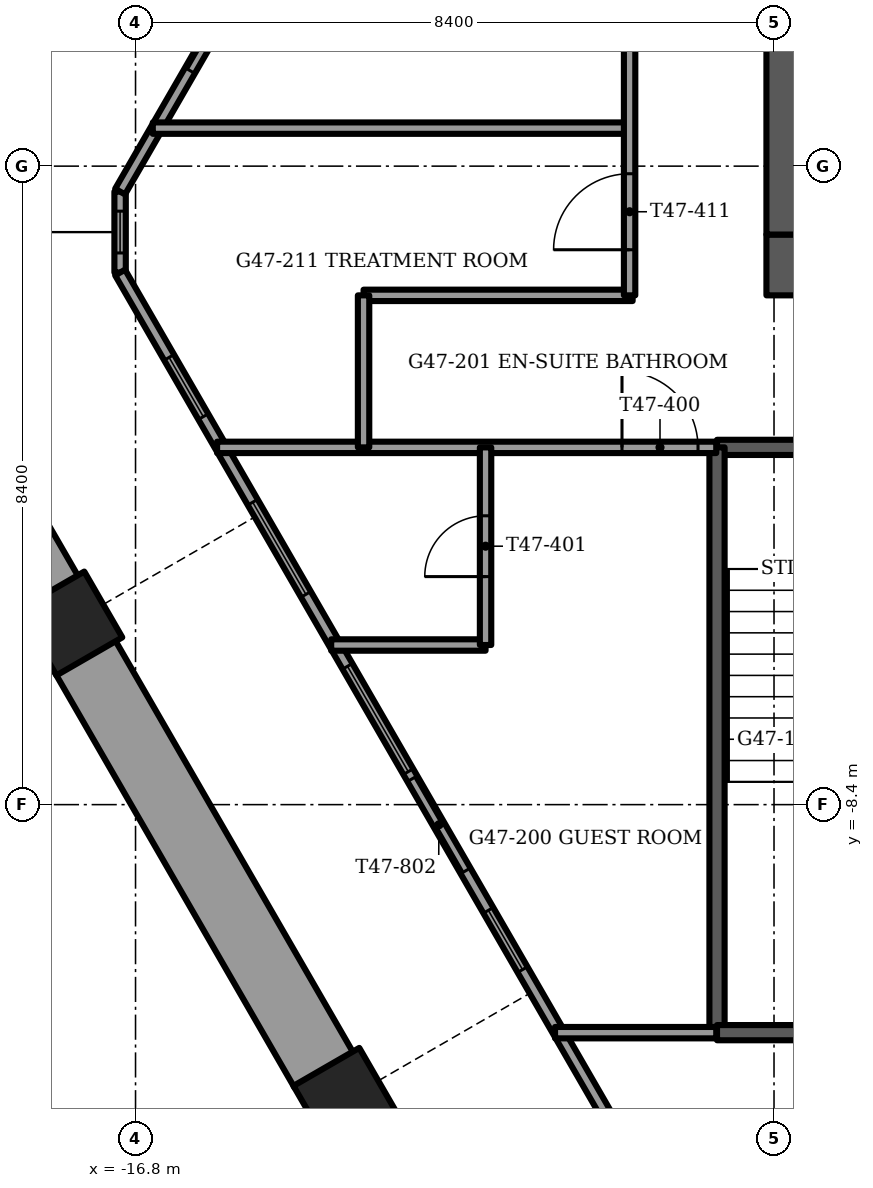
"""IFC4 building model, lengths in metres.
Left out: names, types, materials, properties, quantities, classifications, styles, units other than length and angle.
Written with IfcOpenShell. Run it as: python <this file> out.ifc"""

import sys

from ifc_helpers import new_model, si_unit, direction, frame, frame_2d, origin, origin_2d, place, context, subcontext, project, spatial, rectangle, extrude, element, fill, save


model = new_model("IFC4")
c1 = context("Model", 3, precision=1e-05, world=origin(), true_north=direction((0.0, 1.0)))
c2 = subcontext(c1, "Body", "Model", "MODEL_VIEW")
j1 = project(units=[si_unit("LENGTHUNIT", "METRE"), si_unit("PLANEANGLEUNIT", "RADIAN")], contexts=[c1])
p1 = place(None, origin())
s1 = spatial("IfcSite", under=j1, at=p1, CompositionType="ELEMENT")
p2 = place(p1, origin())
s2 = spatial("IfcBuilding", under=s1, at=p2, CompositionType="ELEMENT")
p3 = place(p2, frame((0.0, 0.0, 190.75)))
s3 = spatial("IfcBuildingStorey", under=s2, at=p3, CompositionType="ELEMENT", Elevation=190.75)
for number, where, z_axis, x_axis in (
    (1, (-17.657, -6.017, -1.2), (0.0, 0.0, 1.0), (-0.5, 0.866, 0.0)),
    (2, (-14.039, -12.283, -1.2), (0.0, 0.0, 1.0), (-0.5, 0.866, 0.0)),
):
    element("IfcColumn", number, at=place(p3, frame(where, z_axis=z_axis, x_axis=x_axis)), inside=s3, PredefinedType="COLUMN", context=c2, shape_type="SweptSolid", body=[
        extrude(rectangle(XDim=1.0, YDim=1.0, at=origin_2d()), origin(), (0.0, 0.0, 1.0), 3.75),
    ])
p4 = place(p3, frame((-8.5, -1.3, -0.3), z_axis=(0.0, 0.0, 1.0), x_axis=(1.0, 0.0, 0.0)))
e3 = element("IfcWall", 3, at=p4, inside=s3, PredefinedType="SHEAR", context=c2, shape_type="SweptSolid", body=[
    extrude(rectangle(XDim=17.0, YDim=0.8, at=frame_2d((8.5, 0.0))), origin(), (0.0, 0.0, 1.0), 3.75),
])
p5 = place(p4, frame((7.7, 0.0, 0.0)))
e4 = element("IfcOpeningElement", 4, at=p5, cuts=e3, PredefinedType="OPENING", context=c2, shape_type="SweptSolid", body=[
    extrude(rectangle(XDim=1.6, YDim=2.1, at=frame_2d((0.8, 1.05))), frame((0.0, 0.4, 0.0), z_axis=(0.0, -1.0, 0.0), x_axis=(1.0, 0.0, 0.0)), (0.0, 0.0, 1.0), 0.8),
])
p6 = place(p3, frame((-8.1, -0.9, -0.3), z_axis=(0.0, 0.0, 1.0), x_axis=(0.0, 1.0, 0.0)))
e5 = element("IfcWall", 5, at=p6, inside=s3, PredefinedType="SHEAR", context=c2, shape_type="SweptSolid", body=[
    extrude(rectangle(XDim=9.8, YDim=0.8, at=frame_2d((4.9, 0.0))), origin(), (0.0, 0.0, 1.0), 3.75),
])
p7 = place(p6, frame((8.15, 0.0, 0.0)))
e6 = element("IfcOpeningElement", 6, at=p7, cuts=e5, PredefinedType="OPENING", context=c2, shape_type="SweptSolid", body=[
    extrude(rectangle(XDim=1.1, YDim=2.1, at=frame_2d((0.55, 1.05))), frame((0.0, 0.4, 0.0), z_axis=(0.0, -1.0, 0.0), x_axis=(1.0, 0.0, 0.0)), (0.0, 0.0, 1.0), 0.8),
])
p8 = place(p3, frame((-17.185, 5.201, 0.0), z_axis=(0.0, 0.0, 1.0), x_axis=(-0.499977443261, -0.866038426532, 0.0)))
e7 = element("IfcWall", 7, at=p8, inside=s3, PredefinedType="PARAPET", context=c2, shape_type="SweptSolid", body=[
    extrude(rectangle(XDim=6.465, YDim=0.9, at=frame_2d((3.232, 0.0))), origin(), (0.0, 0.0, 1.0), 1.1),
])
p9 = place(p3, frame((-20.417, -1.337, 0.0), z_axis=(0.0, 0.0, 1.0), x_axis=(0.500017732557, -0.866015165646, 0.0)))
e8 = element("IfcWall", 8, at=p9, inside=s3, PredefinedType="PARAPET", context=c2, shape_type="SweptSolid", body=[
    extrude(rectangle(XDim=4.962, YDim=0.9, at=frame_2d((2.481, 0.0))), origin(), (0.0, 0.0, 1.0), 1.1),
])
p10 = place(p3, frame((-17.466, -6.449, 0.0), z_axis=(0.0, 0.0, 1.0), x_axis=(0.500013351051, -0.866017695414, 0.0)))
e9 = element("IfcWall", 9, at=p10, inside=s3, PredefinedType="PARAPET", context=c2, shape_type="SweptSolid", body=[
    extrude(rectangle(XDim=6.296, YDim=0.9, at=frame_2d((3.148, 0.0))), origin(), (0.0, 0.0, 1.0), 1.1),
])
p11 = place(p3, frame((-6.826, 17.292, 0.0), z_axis=(0.0, 0.0, 1.0), x_axis=(-0.50000659594, -0.866021595583, 0.0)))
e10 = element("IfcWall", 10, at=p11, inside=s3, PredefinedType="SOLIDWALL", context=c2, shape_type="SweptSolid", body=[
    extrude(rectangle(XDim=20.354, YDim=0.15, at=frame_2d((10.177, 0.0))), origin(), (0.0, 0.0, 1.0), 3.45),
])
p12 = place(p11, frame((5.12, 0.0, 0.15)))
e11 = element("IfcOpeningElement", 11, at=p12, cuts=e10, PredefinedType="OPENING", context=c2, shape_type="SweptSolid", body=[
    extrude(rectangle(XDim=1.4, YDim=2.85, at=frame_2d((0.7, 1.425))), frame((0.0, 0.075, 0.0), z_axis=(0.0, -1.0, 0.0), x_axis=(1.0, 0.0, 0.0)), (0.0, 0.0, 1.0), 0.15),
])
p13 = place(p11, frame((7.663, 0.0, 0.15)))
e12 = element("IfcOpeningElement", 12, at=p13, cuts=e10, PredefinedType="OPENING", context=c2, shape_type="SweptSolid", body=[
    extrude(rectangle(XDim=1.6, YDim=2.85, at=frame_2d((0.8, 1.425))), frame((0.0, 0.075, 0.0), z_axis=(0.0, -1.0, 0.0), x_axis=(1.0, 0.0, 0.0)), (0.0, 0.0, 1.0), 0.15),
])
p14 = place(p11, frame((9.863, 0.0, 0.15)))
e13 = element("IfcOpeningElement", 13, at=p14, cuts=e10, PredefinedType="OPENING", context=c2, shape_type="SweptSolid", body=[
    extrude(rectangle(XDim=1.4, YDim=2.85, at=frame_2d((0.7, 1.425))), frame((0.0, 0.075, 0.0), z_axis=(0.0, -1.0, 0.0), x_axis=(1.0, 0.0, 0.0)), (0.0, 0.0, 1.0), 0.15),
])
p15 = place(p11, frame((12.492, 0.0, 0.15)))
e14 = element("IfcOpeningElement", 14, at=p15, cuts=e10, PredefinedType="OPENING", context=c2, shape_type="SweptSolid", body=[
    extrude(rectangle(XDim=0.9, YDim=2.85, at=frame_2d((0.45, 1.425))), frame((0.0, 0.075, 0.0), z_axis=(0.0, -1.0, 0.0), x_axis=(1.0, 0.0, 0.0)), (0.0, 0.0, 1.0), 0.15),
])
p16 = place(p11, frame((14.063, 0.0, 0.0)))
e15 = element("IfcOpeningElement", 15, at=p16, cuts=e10, PredefinedType="OPENING", context=c2, shape_type="SweptSolid", body=[
    extrude(rectangle(XDim=1.4, YDim=2.4, at=frame_2d((0.7, 1.2))), frame((0.0, 0.075, 0.0), z_axis=(0.0, -1.0, 0.0), x_axis=(1.0, 0.0, 0.0)), (0.0, 0.0, 1.0), 0.15),
])
p17 = place(p11, frame((16.063, 0.0, 0.15)))
e16 = element("IfcOpeningElement", 16, at=p17, cuts=e10, PredefinedType="OPENING", context=c2, shape_type="SweptSolid", body=[
    extrude(rectangle(XDim=0.9, YDim=2.85, at=frame_2d((0.45, 1.425))), frame((0.0, 0.075, 0.0), z_axis=(0.0, -1.0, 0.0), x_axis=(1.0, 0.0, 0.0)), (0.0, 0.0, 1.0), 0.15),
])
p18 = place(p11, frame((17.116, 0.0, 0.0)))
e17 = element("IfcOpeningElement", 17, at=p18, cuts=e10, PredefinedType="OPENING", context=c2, shape_type="SweptSolid", body=[
    extrude(rectangle(XDim=1.4, YDim=2.4, at=frame_2d((0.7, 1.2))), frame((0.0, 0.075, 0.0), z_axis=(0.0, -1.0, 0.0), x_axis=(1.0, 0.0, 0.0)), (0.0, 0.0, 1.0), 0.15),
])
p19 = place(p11, frame((0.735, 0.0, 0.15)))
e18 = element("IfcOpeningElement", 18, at=p19, cuts=e10, PredefinedType="OPENING", context=c2, shape_type="SweptSolid", body=[
    extrude(rectangle(XDim=1.6, YDim=2.73, at=frame_2d((0.8, 1.365))), frame((0.0, 0.075, 0.0), z_axis=(0.0, -1.0, 0.0), x_axis=(1.0, 0.0, 0.0)), (0.0, 0.0, 1.0), 0.15),
])
p20 = place(p3, frame((-17.003, -1.4, 0.0), z_axis=(0.0, 0.0, 1.0), x_axis=(0.500006098247, -0.866021882931, 0.0)))
e19 = element("IfcWall", 19, at=p20, inside=s3, PredefinedType="SOLIDWALL", context=c2, shape_type="SweptSolid", body=[
    extrude(rectangle(XDim=14.578, YDim=0.15, at=frame_2d((7.289, 0.0))), origin(), (0.0, 0.0, 1.0), 3.45),
])
p21 = place(p20, frame((1.289, 0.0, 0.15)))
e20 = element("IfcOpeningElement", 20, at=p21, cuts=e19, PredefinedType="OPENING", context=c2, shape_type="SweptSolid", body=[
    extrude(rectangle(XDim=0.9, YDim=2.85, at=frame_2d((0.45, 1.425))), frame((0.0, 0.075, 0.0), z_axis=(0.0, -1.0, 0.0), x_axis=(1.0, 0.0, 0.0)), (0.0, 0.0, 1.0), 0.15),
])
p22 = place(p20, frame((3.489, 0.0, 0.15)))
e21 = element("IfcOpeningElement", 21, at=p22, cuts=e19, PredefinedType="OPENING", context=c2, shape_type="SweptSolid", body=[
    extrude(rectangle(XDim=1.4, YDim=2.85, at=frame_2d((0.7, 1.425))), frame((0.0, 0.075, 0.0), z_axis=(0.0, -1.0, 0.0), x_axis=(1.0, 0.0, 0.0)), (0.0, 0.0, 1.0), 0.15),
])
p23 = place(p20, frame((5.982, 0.0, 0.15)))
e22 = element("IfcOpeningElement", 22, at=p23, cuts=e19, PredefinedType="OPENING", context=c2, shape_type="SweptSolid", body=[
    extrude(rectangle(XDim=1.6, YDim=2.85, at=frame_2d((0.8, 1.425))), frame((0.0, 0.075, 0.0), z_axis=(0.0, -1.0, 0.0), x_axis=(1.0, 0.0, 0.0)), (0.0, 0.0, 1.0), 0.15),
])
p24 = place(p20, frame((7.689, 0.0, 0.0)))
e23 = element("IfcOpeningElement", 23, at=p24, cuts=e19, PredefinedType="OPENING", context=c2, shape_type="SweptSolid", body=[
    extrude(rectangle(XDim=1.4, YDim=2.4, at=frame_2d((0.7, 1.2))), frame((0.0, 0.075, 0.0), z_axis=(0.0, -1.0, 0.0), x_axis=(1.0, 0.0, 0.0)), (0.0, 0.0, 1.0), 0.15),
])
p25 = place(p20, frame((9.689, 0.0, 0.15)))
e24 = element("IfcOpeningElement", 24, at=p25, cuts=e19, PredefinedType="OPENING", context=c2, shape_type="SweptSolid", body=[
    extrude(rectangle(XDim=0.9, YDim=2.85, at=frame_2d((0.45, 1.425))), frame((0.0, 0.075, 0.0), z_axis=(0.0, -1.0, 0.0), x_axis=(1.0, 0.0, 0.0)), (0.0, 0.0, 1.0), 0.15),
])
p26 = place(p3, frame((-17.003, -0.335, 0.0), z_axis=(0.0, 0.0, 1.0), x_axis=(0.0, -1.0, 0.0)))
e25 = element("IfcWall", 25, at=p26, inside=s3, PredefinedType="SOLIDWALL", context=c2, shape_type="SweptSolid", body=[
    extrude(rectangle(XDim=1.065, YDim=0.15, at=frame_2d((0.533, 0.0))), origin(), (0.0, 0.0, 1.0), 3.45),
])
p27 = place(p26, frame((0.258, 0.0, 0.15)))
e26 = element("IfcOpeningElement", 26, at=p27, cuts=e25, PredefinedType="OPENING", context=c2, shape_type="SweptSolid", body=[
    extrude(rectangle(XDim=0.55, YDim=2.85, at=frame_2d((0.275, 1.425))), frame((0.0, 0.075, 0.0), z_axis=(0.0, -1.0, 0.0), x_axis=(1.0, 0.0, 0.0)), (0.0, 0.0, 1.0), 0.15),
])
p28 = place(p3, frame((-9.15, -3.7, -0.3), z_axis=(0.0, 0.0, 1.0), x_axis=(1.0, 0.0, 0.0)))
e27 = element("IfcWall", 27, at=p28, inside=s3, PredefinedType="SOLIDWALL", context=c2, shape_type="SweptSolid", body=[
    extrude(rectangle(XDim=3.35, YDim=0.2, at=frame_2d((1.675, 0.0))), origin(), (0.0, 0.0, 1.0), 3.75),
])
p29 = place(p28, frame((1.125, 0.0, 0.0)))
e28 = element("IfcOpeningElement", 28, at=p29, cuts=e27, PredefinedType="OPENING", context=c2, shape_type="SweptSolid", body=[
    extrude(rectangle(XDim=1.1, YDim=2.1, at=frame_2d((0.55, 1.05))), frame((0.0, 0.1, 0.0), z_axis=(0.0, -1.0, 0.0), x_axis=(1.0, 0.0, 0.0)), (0.0, 0.0, 1.0), 0.2),
])
p30 = place(p3, frame((-9.15, -3.7, -0.3), z_axis=(0.0, 0.0, 1.0), x_axis=(0.0, -1.0, 0.0)))
e29 = element("IfcWall", 29, at=p30, inside=s3, PredefinedType="SOLIDWALL", context=c2, shape_type="SweptSolid", body=[
    extrude(rectangle(XDim=7.7, YDim=0.2, at=frame_2d((3.85, 0.0))), origin(), (0.0, 0.0, 1.0), 3.75),
])
p31 = place(p3, frame((-9.15, -11.4, -0.3), z_axis=(0.0, 0.0, 1.0), x_axis=(1.0, 0.0, 0.0)))
e30 = element("IfcWall", 30, at=p31, inside=s3, PredefinedType="SOLIDWALL", context=c2, shape_type="SweptSolid", body=[
    extrude(rectangle(XDim=3.35, YDim=0.2, at=frame_2d((1.675, 0.0))), origin(), (0.0, 0.0, 1.0), 3.75),
])
p32 = place(p3, frame((-11.281, -11.4, 0.0), z_axis=(0.0, 0.0, 1.0), x_axis=(1.0, 0.0, 0.0)))
e31 = element("IfcWall", 31, at=p32, inside=s3, PredefinedType="PARTITIONING", context=c2, shape_type="SweptSolid", body=[
    extrude(rectangle(XDim=2.121, YDim=0.15, at=frame_2d((1.061, 0.0))), origin(), (0.0, 0.0, 1.0), 3.45),
])
p33 = place(p3, frame((-14.226, -6.3, 0.0), z_axis=(0.0, 0.0, 1.0), x_axis=(1.0, 0.0, 0.0)))
e32 = element("IfcWall", 32, at=p33, inside=s3, PredefinedType="PARTITIONING", context=c2, shape_type="SweptSolid", body=[
    extrude(rectangle(XDim=2.031, YDim=0.15, at=frame_2d((1.016, 0.0))), origin(), (0.0, 0.0, 1.0), 3.45),
])
p34 = place(p3, frame((-15.727, -3.7, 0.0), z_axis=(0.0, 0.0, 1.0), x_axis=(1.0, 0.0, 0.0)))
e33 = element("IfcWall", 33, at=p34, inside=s3, PredefinedType="PARTITIONING", context=c2, shape_type="SweptSolid", body=[
    extrude(rectangle(XDim=6.567, YDim=0.15, at=frame_2d((3.284, 0.0))), origin(), (0.0, 0.0, 1.0), 3.45),
])
p35 = place(p34, frame((5.327, 0.0, 0.0)))
e34 = element("IfcOpeningElement", 34, at=p35, cuts=e33, PredefinedType="OPENING", context=c2, shape_type="SweptSolid", body=[
    extrude(rectangle(XDim=1.0, YDim=2.1, at=frame_2d((0.5, 1.05))), frame((0.0, 0.075, 0.0), z_axis=(0.0, -1.0, 0.0), x_axis=(1.0, 0.0, 0.0)), (0.0, 0.0, 1.0), 0.15),
])
p36 = place(p3, frame((-13.8, -1.7, 0.0), z_axis=(0.0, 0.0, 1.0), x_axis=(1.0, 0.0, 0.0)))
e35 = element("IfcWall", 35, at=p36, inside=s3, PredefinedType="PARTITIONING", context=c2, shape_type="SweptSolid", body=[
    extrude(rectangle(XDim=3.54, YDim=0.15, at=frame_2d((1.77, 0.0))), origin(), (0.0, 0.0, 1.0), 3.45),
])
p37 = place(p3, frame((-16.573, 0.5, 0.0), z_axis=(0.0, 0.0, 1.0), x_axis=(1.0, 0.0, 0.0)))
e36 = element("IfcWall", 36, at=p37, inside=s3, PredefinedType="PARTITIONING", context=c2, shape_type="SweptSolid", body=[
    extrude(rectangle(XDim=6.273, YDim=0.15, at=frame_2d((3.136, 0.0))), origin(), (0.0, 0.0, 1.0), 3.45),
])
p38 = place(p3, frame((-10.3, -1.7, 0.0), z_axis=(0.0, 0.0, 1.0), x_axis=(0.0, 1.0, 0.0)))
e37 = element("IfcWall", 37, at=p38, inside=s3, PredefinedType="PARTITIONING", context=c2, shape_type="SweptSolid", body=[
    extrude(rectangle(XDim=13.065, YDim=0.15, at=frame_2d((6.532, 0.0))), origin(), (0.0, 0.0, 1.0), 3.45),
])
p39 = place(p38, frame((0.6, 0.0, 0.0)))
e38 = element("IfcOpeningElement", 38, at=p39, cuts=e37, PredefinedType="OPENING", context=c2, shape_type="SweptSolid", body=[
    extrude(rectangle(XDim=1.0, YDim=2.1, at=frame_2d((0.5, 1.05))), frame((0.0, 0.075, 0.0), z_axis=(0.0, -1.0, 0.0), x_axis=(1.0, 0.0, 0.0)), (0.0, 0.0, 1.0), 0.15),
])
p40 = place(p38, frame((4.85, 0.0, 0.0)))
e39 = element("IfcOpeningElement", 39, at=p40, cuts=e37, PredefinedType="OPENING", context=c2, shape_type="SweptSolid", body=[
    extrude(rectangle(XDim=1.0, YDim=2.1, at=frame_2d((0.5, 1.05))), frame((0.0, 0.075, 0.0), z_axis=(0.0, -1.0, 0.0), x_axis=(1.0, 0.0, 0.0)), (0.0, 0.0, 1.0), 0.15),
])
p41 = place(p38, frame((10.162, 0.0, 0.0)))
e40 = element("IfcOpeningElement", 40, at=p41, cuts=e37, PredefinedType="OPENING", context=c2, shape_type="SweptSolid", body=[
    extrude(rectangle(XDim=1.0, YDim=2.1, at=frame_2d((0.5, 1.05))), frame((0.0, 0.075, 0.0), z_axis=(0.0, -1.0, 0.0), x_axis=(1.0, 0.0, 0.0)), (0.0, 0.0, 1.0), 0.15),
])
p42 = place(p3, frame((-12.195, -6.3, 0.0), z_axis=(0.0, 0.0, 1.0), x_axis=(0.0, 1.0, 0.0)))
e41 = element("IfcWall", 41, at=p42, inside=s3, PredefinedType="PARTITIONING", context=c2, shape_type="SweptSolid", body=[
    extrude(rectangle(XDim=2.6, YDim=0.15, at=frame_2d((1.3, 0.0))), origin(), (0.0, 0.0, 1.0), 3.45),
])
p43 = place(p42, frame((0.9, 0.0, 0.0)))
e42 = element("IfcOpeningElement", 42, at=p43, cuts=e41, PredefinedType="OPENING", context=c2, shape_type="SweptSolid", body=[
    extrude(rectangle(XDim=0.8, YDim=2.1, at=frame_2d((0.4, 1.05))), frame((0.0, 0.075, 0.0), z_axis=(0.0, -1.0, 0.0), x_axis=(1.0, 0.0, 0.0)), (0.0, 0.0, 1.0), 0.15),
])
p44 = place(p3, frame((-13.8, -3.7, 0.0), z_axis=(0.0, 0.0, 1.0), x_axis=(0.0, 1.0, 0.0)))
e43 = element("IfcWall", 43, at=p44, inside=s3, PredefinedType="PARTITIONING", context=c2, shape_type="SweptSolid", body=[
    extrude(rectangle(XDim=2.0, YDim=0.15, at=frame_2d((1.0, 0.0))), origin(), (0.0, 0.0, 1.0), 3.45),
])
p45 = place(p18, origin())
e44 = element("IfcDoor", 44, at=p45, inside=s3, OperationType="SLIDING_TO_RIGHT", PredefinedType="DOOR", context=c2, shape_type="SweptSolid", body=[
    extrude(rectangle(XDim=1.4, YDim=2.4, at=frame_2d((0.7, 1.2))), frame((0.0, 0.025, 0.0), z_axis=(0.0, -1.0, 0.0), x_axis=(1.0, 0.0, 0.0)), (0.0, 0.0, 1.0), 0.05),
])
fill(e17, e44)
p46 = place(p21, origin())
e45 = element("IfcWindow", 45, at=p46, inside=s3, PartitioningType="SINGLE_PANEL", PredefinedType="WINDOW", context=c2, shape_type="SweptSolid", body=[
    extrude(rectangle(XDim=0.9, YDim=2.85, at=frame_2d((0.45, 1.425))), frame((0.0, 0.03, 0.0), z_axis=(0.0, -1.0, 0.0), x_axis=(1.0, 0.0, 0.0)), (0.0, 0.0, 1.0), 0.06),
])
fill(e20, e45)
p47 = place(p22, origin())
e46 = element("IfcWindow", 46, at=p47, inside=s3, PartitioningType="SINGLE_PANEL", PredefinedType="WINDOW", context=c2, shape_type="SweptSolid", body=[
    extrude(rectangle(XDim=1.4, YDim=2.85, at=frame_2d((0.7, 1.425))), frame((0.0, 0.03, 0.0), z_axis=(0.0, -1.0, 0.0), x_axis=(1.0, 0.0, 0.0)), (0.0, 0.0, 1.0), 0.06),
])
fill(e21, e46)
p48 = place(p23, origin())
e47 = element("IfcWindow", 47, at=p48, inside=s3, PartitioningType="SINGLE_PANEL", PredefinedType="WINDOW", context=c2, shape_type="SweptSolid", body=[
    extrude(rectangle(XDim=1.6, YDim=2.85, at=frame_2d((0.8, 1.425))), frame((0.0, 0.03, 0.0), z_axis=(0.0, -1.0, 0.0), x_axis=(1.0, 0.0, 0.0)), (0.0, 0.0, 1.0), 0.06),
])
fill(e22, e47)
p49 = place(p24, origin())
e48 = element("IfcDoor", 48, at=p49, inside=s3, OperationType="SLIDING_TO_RIGHT", PredefinedType="DOOR", context=c2, shape_type="SweptSolid", body=[
    extrude(rectangle(XDim=1.4, YDim=2.4, at=frame_2d((0.7, 1.2))), frame((0.0, 0.025, 0.0), z_axis=(0.0, -1.0, 0.0), x_axis=(1.0, 0.0, 0.0)), (0.0, 0.0, 1.0), 0.05),
])
fill(e23, e48)
p50 = place(p25, origin())
e49 = element("IfcWindow", 49, at=p50, inside=s3, PartitioningType="SINGLE_PANEL", PredefinedType="WINDOW", context=c2, shape_type="SweptSolid", body=[
    extrude(rectangle(XDim=0.9, YDim=2.85, at=frame_2d((0.45, 1.425))), frame((0.0, 0.03, 0.0), z_axis=(0.0, -1.0, 0.0), x_axis=(1.0, 0.0, 0.0)), (0.0, 0.0, 1.0), 0.06),
])
fill(e24, e49)
p51 = place(p27, origin())
e50 = element("IfcWindow", 50, at=p51, inside=s3, PartitioningType="SINGLE_PANEL", PredefinedType="WINDOW", context=c2, shape_type="SweptSolid", body=[
    extrude(rectangle(XDim=0.55, YDim=2.85, at=frame_2d((0.275, 1.425))), frame((0.0, 0.03, 0.0), z_axis=(0.0, -1.0, 0.0), x_axis=(1.0, 0.0, 0.0)), (0.0, 0.0, 1.0), 0.06),
])
fill(e26, e50)
p52 = place(p35, origin())
e51 = element("IfcDoor", 51, at=p52, inside=s3, OperationType="SINGLE_SWING_RIGHT", PredefinedType="DOOR", context=c2, shape_type="SweptSolid", body=[
    extrude(rectangle(XDim=1.0, YDim=2.1, at=frame_2d((0.5, 1.05))), frame((0.0, 0.025, 0.0), z_axis=(0.0, -1.0, 0.0), x_axis=(1.0, 0.0, 0.0)), (0.0, 0.0, 1.0), 0.05),
])
fill(e34, e51)
p53 = place(p43, origin())
e52 = element("IfcDoor", 52, at=p53, inside=s3, OperationType="SINGLE_SWING_RIGHT", PredefinedType="DOOR", context=c2, shape_type="SweptSolid", body=[
    extrude(rectangle(XDim=0.8, YDim=2.1, at=frame_2d((0.4, 1.05))), frame((0.0, 0.025, 0.0), z_axis=(0.0, -1.0, 0.0), x_axis=(1.0, 0.0, 0.0)), (0.0, 0.0, 1.0), 0.05),
])
fill(e42, e52)
p54 = place(p39, origin())
e53 = element("IfcDoor", 53, at=p54, inside=s3, OperationType="SINGLE_SWING_RIGHT", PredefinedType="DOOR", context=c2, shape_type="SweptSolid", body=[
    extrude(rectangle(XDim=1.0, YDim=2.1, at=frame_2d((0.5, 1.05))), frame((0.0, 0.025, 0.0), z_axis=(0.0, -1.0, 0.0), x_axis=(1.0, 0.0, 0.0)), (0.0, 0.0, 1.0), 0.05),
])
fill(e38, e53)
save(model, sys.argv[1])
